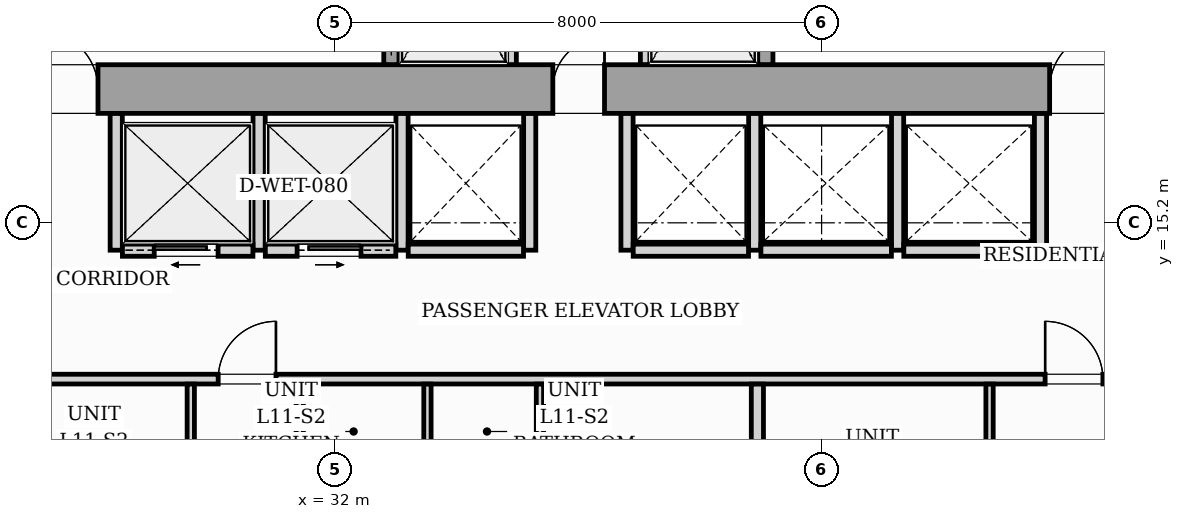
"""IFC4 building model, lengths in metres.
Left out: names, types, materials, properties, quantities, classifications, styles, units other than length and angle.
Written with IfcOpenShell. Run it as: python <this file> out.ifc"""

import sys

from ifc_helpers import new_model, si_unit, direction, frame, frame_2d, origin, origin_2d, place, context, subcontext, project, spatial, rectangle, i_section, extrude, source, transform, mapped, element, fill, save


model = new_model("IFC4")
c1 = context("Model", 3, precision=1e-05, world=origin(), true_north=direction((0.0, 1.0)))
c2 = subcontext(c1, "Body", "Model", "MODEL_VIEW")
j1 = project(units=[si_unit("LENGTHUNIT", "METRE"), si_unit("PLANEANGLEUNIT", "RADIAN")], contexts=[c1])
p1 = place(None, origin())
s1 = spatial("IfcSite", under=j1, at=p1, CompositionType="ELEMENT")
p2 = place(p1, origin())
s2 = spatial("IfcBuilding", under=s1, at=p2, CompositionType="ELEMENT")
p3 = place(p2, frame((0.0, 0.0, 42.2)))
s3 = spatial("IfcBuildingStorey", under=s2, at=p3, CompositionType="ELEMENT", Elevation=42.2)
m1 = source(origin(), c2, "Body", "SweptSolid", [
    extrude(i_section(OverallWidth=0.437, OverallDepth=0.514, WebThickness=0.061, FlangeThickness=0.097, FilletRadius=0.018, at=origin_2d()), origin(), (0.0, 0.0, 1.0), 3.196),
])
for number, where, z_axis, x_axis in (
    (1, (33.12, 17.4, 0.002), (0.0, 0.0, 1.0), (1.0, 0.0, 0.0)),
    (2, (38.88, 17.4, 0.002), (0.0, 0.0, 1.0), (1.0, 0.0, 0.0)),
):
    element("IfcColumn", number, at=place(p3, frame(where, z_axis=z_axis, x_axis=x_axis)), inside=s3, PredefinedType="PILASTER", context=c2, shape_type="MappedRepresentation", body=[
        mapped(m1, transform((0.0, 0.0, 0.0), scale=1.0)),
    ])
p4 = place(p3, frame((26.0, 17.4, 0.0), z_axis=(0.0, 0.0, 1.0), x_axis=(1.0, 0.0, 0.0)))
e3 = element("IfcWall", 3, at=p4, inside=s3, PredefinedType="SHEAR", context=c2, shape_type="SweptSolid", body=[
    extrude(rectangle(XDim=20.0, YDim=0.8, at=frame_2d((10.0, 0.0))), origin(), (0.0, 0.0, 1.0), 3.2),
])
p5 = place(p4, frame((1.15, 0.0, 0.0)))
e4 = element("IfcOpeningElement", 4, at=p5, cuts=e3, PredefinedType="OPENING", context=c2, shape_type="SweptSolid", body=[
    extrude(rectangle(XDim=0.95, YDim=2.06, at=frame_2d((0.475, 1.03))), frame((0.0, 0.41, 0.0), z_axis=(0.0, -1.0, 0.0), x_axis=(1.0, 0.0, 0.0)), (0.0, 0.0, 1.0), 0.82),
])
p6 = place(p4, frame((9.58, 0.0, 0.0)))
e5 = element("IfcOpeningElement", 5, at=p6, cuts=e3, PredefinedType="OPENING", context=c2, shape_type="SweptSolid", body=[
    extrude(rectangle(XDim=0.85, YDim=2.0, at=frame_2d((0.425, 1.0))), frame((0.0, 0.41, 0.0), z_axis=(0.0, -1.0, 0.0), x_axis=(1.0, 0.0, 0.0)), (0.0, 0.0, 1.0), 0.82),
])
p7 = place(p4, frame((17.75, 0.0, 0.0)))
e6 = element("IfcOpeningElement", 6, at=p7, cuts=e3, PredefinedType="OPENING", context=c2, shape_type="SweptSolid", body=[
    extrude(rectangle(XDim=0.95, YDim=2.06, at=frame_2d((0.475, 1.03))), frame((0.0, 0.41, 0.0), z_axis=(0.0, -1.0, 0.0), x_axis=(1.0, 0.0, 0.0)), (0.0, 0.0, 1.0), 0.82),
])
p8 = place(p3, frame((32.925, 17.802, 0.0), z_axis=(0.0, 0.0, 1.0), x_axis=(0.0, 1.0, 0.0)))
e7 = element("IfcWall", 7, at=p8, inside=s3, PredefinedType="SOLIDWALL", context=c2, shape_type="SweptSolid", body=[
    extrude(rectangle(XDim=2.646, YDim=0.25, at=frame_2d((1.323, 0.0))), origin(), (0.0, 0.0, 1.0), 3.2),
])
p9 = place(p8, frame((0.648, 0.0, 0.0)))
e8 = element("IfcOpeningElement", 8, at=p9, cuts=e7, PredefinedType="OPENING", context=c2, shape_type="SweptSolid", body=[
    extrude(rectangle(XDim=1.1, YDim=2.08, at=frame_2d((0.55, 1.04))), frame((0.0, 0.135, 0.0), z_axis=(0.0, -1.0, 0.0), x_axis=(1.0, 0.0, 0.0)), (0.0, 0.0, 1.0), 0.27),
])
for number, where, z_axis, x_axis in (
    (9, (34.9, 17.802, 0.0), (0.0, 0.0, 1.0), (0.0, 1.0, 0.0)),
    (10, (37.1, 17.802, 0.0), (0.0, 0.0, 1.0), (0.0, 1.0, 0.0)),
):
    element("IfcWall", number, at=place(p3, frame(where, z_axis=z_axis, x_axis=x_axis)), inside=s3, PredefinedType="PARTITIONING", context=c2, shape_type="SweptSolid", body=[
        extrude(rectangle(XDim=2.646, YDim=0.16, at=frame_2d((1.323, 0.0))), origin(), (0.0, 0.0, 1.0), 2.94),
    ])
p10 = place(p3, frame((39.075, 17.802, 0.0), z_axis=(0.0, 0.0, 1.0), x_axis=(0.0, 1.0, 0.0)))
e11 = element("IfcWall", 11, at=p10, inside=s3, PredefinedType="SOLIDWALL", context=c2, shape_type="SweptSolid", body=[
    extrude(rectangle(XDim=2.646, YDim=0.25, at=frame_2d((1.323, 0.0))), origin(), (0.0, 0.0, 1.0), 3.2),
])
p11 = place(p10, frame((0.648, 0.0, 0.0)))
e12 = element("IfcOpeningElement", 12, at=p11, cuts=e11, PredefinedType="OPENING", context=c2, shape_type="SweptSolid", body=[
    extrude(rectangle(XDim=1.1, YDim=2.08, at=frame_2d((0.55, 1.04))), frame((0.0, 0.135, 0.0), z_axis=(0.0, -1.0, 0.0), x_axis=(1.0, 0.0, 0.0)), (0.0, 0.0, 1.0), 0.27),
])
for number, where, z_axis, x_axis in (
    (13, (28.4, 14.75, 0.0), (0.0, 0.0, 1.0), (0.0, 1.0, 0.0)),
    (14, (30.75, 14.75, 0.0), (0.0, 0.0, 1.0), (0.0, 1.0, 0.0)),
    (15, (33.1, 14.75, 0.0), (0.0, 0.0, 1.0), (0.0, 1.0, 0.0)),
):
    element("IfcWall", number, at=place(p3, frame(where, z_axis=z_axis, x_axis=x_axis)), inside=s3, PredefinedType="PARTITIONING", context=c2, shape_type="SweptSolid", body=[
        extrude(rectangle(XDim=2.248, YDim=0.2, at=frame_2d((1.124, 0.0))), origin(), (0.0, 0.0, 1.0), 2.94),
    ])
p12 = place(p3, frame((28.502, 14.75, 0.0), z_axis=(0.0, 0.0, 1.0), x_axis=(1.0, 0.0, 0.0)))
e16 = element("IfcWall", 16, at=p12, inside=s3, PredefinedType="PARTITIONING", context=c2, shape_type="SweptSolid", body=[
    extrude(rectangle(XDim=2.146, YDim=0.2, at=frame_2d((1.073, 0.0))), origin(), (0.0, 0.0, 1.0), 2.94),
])
p13 = place(p12, frame((0.523, 0.0, 0.0)))
e17 = element("IfcOpeningElement", 17, at=p13, cuts=e16, PredefinedType="OPENING", context=c2, shape_type="SweptSolid", body=[
    extrude(rectangle(XDim=1.05, YDim=2.08, at=frame_2d((0.525, 1.04))), frame((0.0, 0.11, 0.0), z_axis=(0.0, -1.0, 0.0), x_axis=(1.0, 0.0, 0.0)), (0.0, 0.0, 1.0), 0.22),
])
p14 = place(p3, frame((30.852, 14.75, 0.0), z_axis=(0.0, 0.0, 1.0), x_axis=(1.0, 0.0, 0.0)))
e18 = element("IfcWall", 18, at=p14, inside=s3, PredefinedType="PARTITIONING", context=c2, shape_type="SweptSolid", body=[
    extrude(rectangle(XDim=2.146, YDim=0.2, at=frame_2d((1.073, 0.0))), origin(), (0.0, 0.0, 1.0), 2.94),
])
p15 = place(p14, frame((0.523, 0.0, 0.0)))
e19 = element("IfcOpeningElement", 19, at=p15, cuts=e18, PredefinedType="OPENING", context=c2, shape_type="SweptSolid", body=[
    extrude(rectangle(XDim=1.05, YDim=2.08, at=frame_2d((0.525, 1.04))), frame((0.0, 0.11, 0.0), z_axis=(0.0, -1.0, 0.0), x_axis=(1.0, 0.0, 0.0)), (0.0, 0.0, 1.0), 0.22),
])
p16 = place(p3, frame((35.2, 14.75, 0.0), z_axis=(0.0, 0.0, 1.0), x_axis=(0.0, 1.0, 0.0)))
e20 = element("IfcWall", 20, at=p16, inside=s3, PredefinedType="PARTITIONING", context=c2, shape_type="SweptSolid", body=[
    extrude(rectangle(XDim=2.248, YDim=0.2, at=frame_2d((1.124, 0.0))), origin(), (0.0, 0.0, 1.0), 2.94),
])
p17 = place(p3, frame((33.202, 14.75, 0.0), z_axis=(0.0, 0.0, 1.0), x_axis=(1.0, 0.0, 0.0)))
e21 = element("IfcWall", 21, at=p17, inside=s3, PredefinedType="PARTITIONING", context=c2, shape_type="SweptSolid", body=[
    extrude(rectangle(XDim=1.896, YDim=0.2, at=frame_2d((0.948, 0.0))), origin(), (0.0, 0.0, 1.0), 2.94),
])
for number, where, z_axis, x_axis in (
    (22, (36.8, 14.75, 0.0), (0.0, 0.0, 1.0), (0.0, 1.0, 0.0)),
    (23, (38.9, 14.75, 0.0), (0.0, 0.0, 1.0), (0.0, 1.0, 0.0)),
):
    element("IfcWall", number, at=place(p3, frame(where, z_axis=z_axis, x_axis=x_axis)), inside=s3, PredefinedType="PARTITIONING", context=c2, shape_type="SweptSolid", body=[
        extrude(rectangle(XDim=2.248, YDim=0.2, at=frame_2d((1.124, 0.0))), origin(), (0.0, 0.0, 1.0), 2.94),
    ])
p18 = place(p3, frame((36.902, 14.75, 0.0), z_axis=(0.0, 0.0, 1.0), x_axis=(1.0, 0.0, 0.0)))
e24 = element("IfcWall", 24, at=p18, inside=s3, PredefinedType="PARTITIONING", context=c2, shape_type="SweptSolid", body=[
    extrude(rectangle(XDim=1.896, YDim=0.2, at=frame_2d((0.948, 0.0))), origin(), (0.0, 0.0, 1.0), 2.94),
])
for number, where, z_axis, x_axis in (
    (25, (41.25, 14.75, 0.0), (0.0, 0.0, 1.0), (0.0, 1.0, 0.0)),
    (26, (43.6, 14.75, 0.0), (0.0, 0.0, 1.0), (0.0, 1.0, 0.0)),
):
    element("IfcWall", number, at=place(p3, frame(where, z_axis=z_axis, x_axis=x_axis)), inside=s3, PredefinedType="PARTITIONING", context=c2, shape_type="SweptSolid", body=[
        extrude(rectangle(XDim=2.248, YDim=0.2, at=frame_2d((1.124, 0.0))), origin(), (0.0, 0.0, 1.0), 2.94),
    ])
for number, where, z_axis, x_axis in (
    (27, (39.002, 14.75, 0.0), (0.0, 0.0, 1.0), (1.0, 0.0, 0.0)),
    (28, (41.352, 14.75, 0.0), (0.0, 0.0, 1.0), (1.0, 0.0, 0.0)),
):
    element("IfcWall", number, at=place(p3, frame(where, z_axis=z_axis, x_axis=x_axis)), inside=s3, PredefinedType="PARTITIONING", context=c2, shape_type="SweptSolid", body=[
        extrude(rectangle(XDim=2.146, YDim=0.2, at=frame_2d((1.073, 0.0))), origin(), (0.0, 0.0, 1.0), 2.94),
    ])
p19 = place(p3, frame((15.2, 12.63, 0.0), z_axis=(0.0, 0.0, 1.0), x_axis=(1.0, 0.0, 0.0)))
e29 = element("IfcWall", 29, at=p19, inside=s3, PredefinedType="PARTITIONING", context=c2, shape_type="SweptSolid", body=[
    extrude(rectangle(XDim=37.1, YDim=0.16, at=frame_2d((18.55, 0.0))), origin(), (0.0, 0.0, 1.0), 2.94),
])
p20 = place(p19, frame((1.572, 0.0, 0.0)))
e30 = element("IfcOpeningElement", 30, at=p20, cuts=e29, PredefinedType="OPENING", context=c2, shape_type="SweptSolid", body=[
    extrude(rectangle(XDim=0.95, YDim=2.06, at=frame_2d((0.475, 1.03))), frame((0.0, 0.09, 0.0), z_axis=(0.0, -1.0, 0.0), x_axis=(1.0, 0.0, 0.0)), (0.0, 0.0, 1.0), 0.18),
])
p21 = place(p19, frame((14.877, 0.0, 0.0)))
e31 = element("IfcOpeningElement", 31, at=p21, cuts=e29, PredefinedType="OPENING", context=c2, shape_type="SweptSolid", body=[
    extrude(rectangle(XDim=0.95, YDim=2.06, at=frame_2d((0.475, 1.03))), frame((0.0, 0.09, 0.0), z_axis=(0.0, -1.0, 0.0), x_axis=(1.0, 0.0, 0.0)), (0.0, 0.0, 1.0), 0.18),
])
p22 = place(p19, frame((28.476, 0.0, 0.0)))
e32 = element("IfcOpeningElement", 32, at=p22, cuts=e29, PredefinedType="OPENING", context=c2, shape_type="SweptSolid", body=[
    extrude(rectangle(XDim=0.95, YDim=2.06, at=frame_2d((0.475, 1.03))), frame((0.0, 0.09, 0.0), z_axis=(0.0, -1.0, 0.0), x_axis=(1.0, 0.0, 0.0)), (0.0, 0.0, 1.0), 0.18),
])
p23 = place(p3, frame((35.368, 2.78, 0.0), z_axis=(0.0, 0.0, 1.0), x_axis=(0.0, 1.0, 0.0)))
e33 = element("IfcWall", 33, at=p23, inside=s3, PredefinedType="PARTITIONING", context=c2, shape_type="SweptSolid", body=[
    extrude(rectangle(XDim=9.768, YDim=0.12, at=frame_2d((4.884, 0.0))), origin(), (0.0, 0.0, 1.0), 2.94),
])
p24 = place(p23, frame((6.5, 0.0, 0.0)))
e34 = element("IfcOpeningElement", 34, at=p24, cuts=e33, PredefinedType="OPENING", context=c2, shape_type="SweptSolid", body=[
    extrude(rectangle(XDim=0.9, YDim=2.05, at=frame_2d((0.45, 1.025))), frame((0.0, 0.07, 0.0), z_axis=(0.0, -1.0, 0.0), x_axis=(1.0, 0.0, 0.0)), (0.0, 0.0, 1.0), 0.14),
])
for number, where, z_axis, x_axis in (
    (35, (33.518, 10.442, 0.0), (0.0, 0.0, 1.0), (0.0, 1.0, 0.0)),
    (36, (31.418, 10.442, 0.0), (0.0, 0.0, 1.0), (0.0, 1.0, 0.0)),
):
    element("IfcWall", number, at=place(p3, frame(where, z_axis=z_axis, x_axis=x_axis)), inside=s3, PredefinedType="PARTITIONING", context=c2, shape_type="SweptSolid", body=[
        extrude(rectangle(XDim=2.106, YDim=0.12, at=frame_2d((1.053, 0.0))), origin(), (0.0, 0.0, 1.0), 2.94),
    ])
p25 = place(p3, frame((29.626, 2.78, 0.0), z_axis=(0.0, 0.0, 1.0), x_axis=(0.0, 1.0, 0.0)))
e37 = element("IfcWall", 37, at=p25, inside=s3, PredefinedType="PARTITIONING", context=c2, shape_type="SweptSolid", body=[
    extrude(rectangle(XDim=9.768, YDim=0.12, at=frame_2d((4.884, 0.0))), origin(), (0.0, 0.0, 1.0), 2.94),
])
p26 = place(p25, frame((4.54, 0.0, 0.0)))
e38 = element("IfcOpeningElement", 38, at=p26, cuts=e37, PredefinedType="OPENING", context=c2, shape_type="SweptSolid", body=[
    extrude(rectangle(XDim=0.85, YDim=2.05, at=frame_2d((0.425, 1.025))), frame((0.0, 0.07, 0.0), z_axis=(0.0, -1.0, 0.0), x_axis=(1.0, 0.0, 0.0)), (0.0, 0.0, 1.0), 0.14),
])
p27 = place(p3, frame((38.944, 2.78, 0.0), z_axis=(0.0, 0.0, 1.0), x_axis=(0.0, 1.0, 0.0)))
e39 = element("IfcWall", 39, at=p27, inside=s3, PredefinedType="PARTITIONING", context=c2, shape_type="SweptSolid", body=[
    extrude(rectangle(XDim=9.768, YDim=0.2, at=frame_2d((4.884, 0.0))), origin(), (0.0, 0.0, 1.0), 2.94),
])
p28 = place(p3, frame((42.762, 2.962, 0.0), z_axis=(0.0, 0.0, 1.0), x_axis=(0.0, 1.0, 0.0)))
e40 = element("IfcWall", 40, at=p28, inside=s3, PredefinedType="PARTITIONING", context=c2, shape_type="SweptSolid", body=[
    extrude(rectangle(XDim=9.586, YDim=0.12, at=frame_2d((4.793, 0.0))), origin(), (0.0, 0.0, 1.0), 2.94),
])
p29 = place(p28, frame((4.358, 0.0, 0.0)))
e41 = element("IfcOpeningElement", 41, at=p29, cuts=e40, PredefinedType="OPENING", context=c2, shape_type="SweptSolid", body=[
    extrude(rectangle(XDim=0.85, YDim=2.05, at=frame_2d((0.425, 1.025))), frame((0.0, 0.07, 0.0), z_axis=(0.0, -1.0, 0.0), x_axis=(1.0, 0.0, 0.0)), (0.0, 0.0, 1.0), 0.14),
])
m2 = source(origin(), c2, "Body", "SweptSolid", [
    extrude(rectangle(XDim=0.95, YDim=2.06, at=frame_2d((0.475, 1.03))), frame((0.0, 0.025, 0.0), z_axis=(0.0, -1.0, 0.0), x_axis=(1.0, 0.0, 0.0)), (0.0, 0.0, 1.0), 0.05),
])
p30 = place(p5, origin())
e42 = element("IfcDoor", 42, at=p30, inside=s3, OperationType="SINGLE_SWING_LEFT", PredefinedType="DOOR", context=c2, shape_type="MappedRepresentation", body=[
    mapped(m2, transform((0.0, 0.0, 0.0), scale=1.0)),
])
fill(e4, e42)
m3 = source(origin(), c2, "Body", "SweptSolid", [
    extrude(rectangle(XDim=0.85, YDim=2.0, at=frame_2d((0.425, 1.0))), frame((0.0, 0.025, 0.0), z_axis=(0.0, -1.0, 0.0), x_axis=(1.0, 0.0, 0.0)), (0.0, 0.0, 1.0), 0.05),
])
p31 = place(p6, origin())
e43 = element("IfcDoor", 43, at=p31, inside=s3, OperationType="SINGLE_SWING_RIGHT", PredefinedType="DOOR", context=c2, shape_type="MappedRepresentation", body=[
    mapped(m3, transform((0.0, 0.0, 0.0), scale=1.0)),
])
fill(e5, e43)
p32 = place(p7, origin())
e44 = element("IfcDoor", 44, at=p32, inside=s3, OperationType="SINGLE_SWING_RIGHT", PredefinedType="DOOR", context=c2, shape_type="MappedRepresentation", body=[
    mapped(m2, transform((0.0, 0.0, 0.0), scale=1.0)),
])
fill(e6, e44)
m4 = source(origin(), c2, "Body", "SweptSolid", [
    extrude(rectangle(XDim=1.05, YDim=2.08, at=frame_2d((0.525, 1.04))), frame((0.0, 0.025, 0.0), z_axis=(0.0, -1.0, 0.0), x_axis=(1.0, 0.0, 0.0)), (0.0, 0.0, 1.0), 0.05),
])
p33 = place(p13, origin())
e45 = element("IfcDoor", 45, at=p33, inside=s3, OperationType="SLIDING_TO_LEFT", PredefinedType="DOOR", context=c2, shape_type="MappedRepresentation", body=[
    mapped(m4, transform((0.0, 0.0, 0.0), scale=1.0)),
])
fill(e17, e45)
p34 = place(p15, origin())
e46 = element("IfcDoor", 46, at=p34, inside=s3, OperationType="SLIDING_TO_RIGHT", PredefinedType="DOOR", context=c2, shape_type="MappedRepresentation", body=[
    mapped(m4, transform((0.0, 0.0, 0.0), scale=1.0)),
])
fill(e19, e46)
m5 = source(origin(), c2, "Body", "SweptSolid", [
    extrude(rectangle(XDim=0.95, YDim=2.06, at=frame_2d((0.475, 1.03))), frame((0.0, 0.025, 0.0), z_axis=(0.0, -1.0, 0.0), x_axis=(1.0, 0.0, 0.0)), (0.0, 0.0, 1.0), 0.05),
])
p35 = place(p21, origin())
e47 = element("IfcDoor", 47, at=p35, inside=s3, OperationType="SINGLE_SWING_RIGHT", PredefinedType="DOOR", context=c2, shape_type="MappedRepresentation", body=[
    mapped(m5, transform((0.0, 0.0, 0.0), scale=1.0)),
])
fill(e31, e47)
p36 = place(p22, origin())
e48 = element("IfcDoor", 48, at=p36, inside=s3, OperationType="SINGLE_SWING_LEFT", PredefinedType="DOOR", context=c2, shape_type="MappedRepresentation", body=[
    mapped(m5, transform((0.0, 0.0, 0.0), scale=1.0)),
])
fill(e32, e48)
save(model, sys.argv[1])
